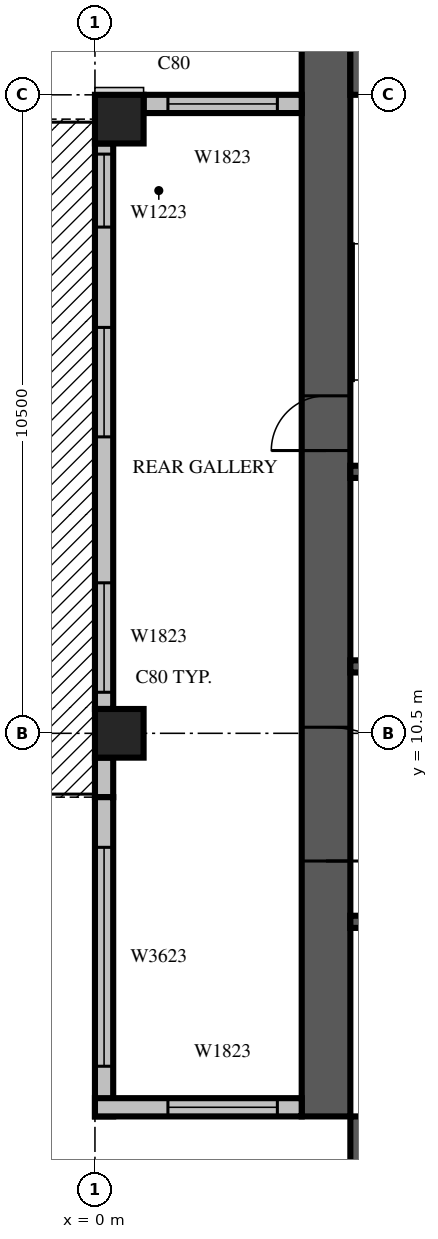
"""IFC4 building model, lengths in metres.
Left out: names, types, materials, properties, quantities, classifications, styles, units other than length and angle.
Written with IfcOpenShell. Run it as: python <this file> out.ifc"""

import sys

from ifc_helpers import new_model, si_unit, direction, frame, frame_2d, origin, origin_2d, place, context, subcontext, project, spatial, rectangle, extrude, source, transform, mapped, element, fill, save


model = new_model("IFC4")
c1 = context("Model", 3, precision=1e-05, world=origin(), true_north=direction((0.0, 1.0)))
c2 = subcontext(c1, "Body", "Model", "MODEL_VIEW")
j1 = project(units=[si_unit("LENGTHUNIT", "METRE"), si_unit("PLANEANGLEUNIT", "RADIAN")], contexts=[c1])
p1 = place(None, origin())
s1 = spatial("IfcSite", under=j1, at=p1, CompositionType="ELEMENT")
p2 = place(p1, origin())
s2 = spatial("IfcBuilding", under=s1, at=p2, CompositionType="ELEMENT")
p3 = place(p2, frame((0.0, 0.0, 246.2)))
s3 = spatial("IfcBuildingStorey", under=s2, at=p3, CompositionType="ELEMENT", Elevation=246.2)
m1 = source(origin(), c2, "Body", "SweptSolid", [
    extrude(rectangle(XDim=0.8, YDim=0.8, at=origin_2d()), origin(), (0.0, 0.0, 1.0), 3.8),
])
for number, where, z_axis, x_axis in (
    (1, (0.4, 10.5, 0.0), (0.0, 0.0, 1.0), (1.0, 0.0, 0.0)),
    (2, (0.4, 20.6, 0.0), (0.0, 0.0, 1.0), (1.0, 0.0, 0.0)),
):
    element("IfcColumn", number, at=place(p3, frame(where, z_axis=z_axis, x_axis=x_axis)), inside=s3, PredefinedType="COLUMN", context=c2, shape_type="MappedRepresentation", body=[
        mapped(m1, transform((0.0, 0.0, 0.0), scale=1.0)),
    ])
m2 = source(origin(), c2, "Body", "SweptSolid", [
    extrude(rectangle(XDim=17.6, YDim=0.8, at=frame_2d((8.8, 0.0))), origin(), (0.0, 0.0, 1.0), 3.8),
])
p4 = place(p3, frame((3.8, 4.2, 0.0), z_axis=(0.0, 0.0, 1.0), x_axis=(0.0, 1.0, 0.0)))
e3 = element("IfcWall", 3, at=p4, inside=s3, PredefinedType="SHEAR", context=c2, shape_type="MappedRepresentation", body=[
    mapped(m2, transform((0.0, 0.0, 0.0), scale=1.0)),
])
m3 = source(origin(), c2, "Body", "SweptSolid", [
    extrude(rectangle(XDim=2.2, YDim=2.1, at=frame_2d((1.1, 1.05))), frame((0.0, 0.41, 0.0), z_axis=(0.0, -1.0, 0.0), x_axis=(1.0, 0.0, 0.0)), (0.0, 0.0, 1.0), 0.82),
])
p5 = place(p4, frame((4.2, 0.0, 0.0)))
e4 = element("IfcOpeningElement", 4, at=p5, cuts=e3, PredefinedType="OPENING", context=c2, shape_type="MappedRepresentation", body=[
    mapped(m3, transform((0.0, 0.0, 0.0), scale=1.0)),
])
m4 = source(origin(), c2, "Body", "SweptSolid", [
    extrude(rectangle(XDim=0.9, YDim=2.1, at=frame_2d((0.45, 1.05))), frame((0.0, 0.41, 0.0), z_axis=(0.0, -1.0, 0.0), x_axis=(1.0, 0.0, 0.0)), (0.0, 0.0, 1.0), 0.82),
])
p6 = place(p4, frame((10.95, 0.0, 0.0)))
e5 = element("IfcOpeningElement", 5, at=p6, cuts=e3, PredefinedType="OPENING", context=c2, shape_type="MappedRepresentation", body=[
    mapped(m4, transform((0.0, 0.0, 0.0), scale=1.0)),
])
p7 = place(p3, frame((4.2, 3.8, 0.0), z_axis=(0.0, 0.0, 1.0), x_axis=(1.0, 0.0, 0.0)))
e6 = element("IfcWall", 6, at=p7, inside=s3, PredefinedType="SHEAR", context=c2, shape_type="MappedRepresentation", body=[
    mapped(m2, transform((0.0, 0.0, 0.0), scale=1.0)),
])
p8 = place(p7, frame((12.75, 0.0, 0.0)))
e7 = element("IfcOpeningElement", 7, at=p8, cuts=e6, PredefinedType="OPENING", context=c2, shape_type="MappedRepresentation", body=[
    mapped(m4, transform((0.0, 0.0, 0.0), scale=1.0)),
])
m5 = source(origin(), c2, "Body", "SweptSolid", [
    extrude(rectangle(XDim=16.8, YDim=0.8, at=frame_2d((8.4, 0.0))), origin(), (0.0, 0.0, 1.0), 3.8),
])
p9 = place(p3, frame((4.2, 21.4, 0.0), z_axis=(0.0, 0.0, 1.0), x_axis=(1.0, 0.0, 0.0)))
e8 = element("IfcWall", 8, at=p9, inside=s3, PredefinedType="SHEAR", context=c2, shape_type="MappedRepresentation", body=[
    mapped(m5, transform((0.0, 0.0, 0.0), scale=1.0)),
])
m6 = source(origin(), c2, "Body", "SweptSolid", [
    extrude(rectangle(XDim=1.2, YDim=2.1, at=frame_2d((0.6, 1.05))), frame((0.0, 0.41, 0.0), z_axis=(0.0, -1.0, 0.0), x_axis=(1.0, 0.0, 0.0)), (0.0, 0.0, 1.0), 0.82),
])
p10 = place(p9, frame((6.2, 0.0, 0.0)))
e9 = element("IfcOpeningElement", 9, at=p10, cuts=e8, PredefinedType="OPENING", context=c2, shape_type="MappedRepresentation", body=[
    mapped(m6, transform((0.0, 0.0, 0.0), scale=1.0)),
])
m7 = source(origin(), c2, "Body", "SweptSolid", [
    extrude(rectangle(XDim=2.6, YDim=0.3, at=frame_2d((1.3, 0.0))), origin(), (0.0, 0.0, 1.0), 3.4),
])
p11 = place(p3, frame((3.4, 20.85, 0.0), z_axis=(0.0, 0.0, 1.0), x_axis=(-1.0, 0.0, 0.0)))
e10 = element("IfcWall", 10, at=p11, inside=s3, PredefinedType="STANDARD", context=c2, shape_type="MappedRepresentation", body=[
    mapped(m7, transform((0.0, 0.0, 0.0), scale=1.0)),
])
m8 = source(origin(), c2, "Body", "SweptSolid", [
    extrude(rectangle(XDim=1.8, YDim=2.3, at=frame_2d((0.9, 1.15))), frame((0.0, 0.16, 0.0), z_axis=(0.0, -1.0, 0.0), x_axis=(1.0, 0.0, 0.0)), (0.0, 0.0, 1.0), 0.32),
])
p12 = place(p11, frame((0.4, 0.0, 0.6)))
e11 = element("IfcOpeningElement", 11, at=p12, cuts=e10, PredefinedType="OPENING", context=c2, shape_type="MappedRepresentation", body=[
    mapped(m8, transform((0.0, 0.0, 0.0), scale=1.0)),
])
m9 = source(origin(), c2, "Body", "SweptSolid", [
    extrude(rectangle(XDim=9.3, YDim=0.3, at=frame_2d((4.65, 0.0))), origin(), (0.0, 0.0, 1.0), 3.4),
])
p13 = place(p3, frame((0.15, 20.2, 0.0), z_axis=(0.0, 0.0, 1.0), x_axis=(0.0, -1.0, 0.0)))
e12 = element("IfcWall", 12, at=p13, inside=s3, PredefinedType="STANDARD", context=c2, shape_type="MappedRepresentation", body=[
    mapped(m9, transform((0.0, 0.0, 0.0), scale=1.0)),
])
m10 = source(origin(), c2, "Body", "SweptSolid", [
    extrude(rectangle(XDim=1.8, YDim=2.4, at=frame_2d((0.9, 1.2))), frame((0.0, 0.16, 0.0), z_axis=(0.0, -1.0, 0.0), x_axis=(1.0, 0.0, 0.0)), (0.0, 0.0, 1.0), 0.32),
])
p14 = place(p13, frame((3.025, 0.0, 0.0)))
e13 = element("IfcOpeningElement", 13, at=p14, cuts=e12, PredefinedType="OPENING", context=c2, shape_type="MappedRepresentation", body=[
    mapped(m10, transform((0.0, 0.0, 0.0), scale=1.0)),
])
m11 = source(origin(), c2, "Body", "SweptSolid", [
    extrude(rectangle(XDim=1.2, YDim=2.3, at=frame_2d((0.6, 1.15))), frame((0.0, 0.16, 0.0), z_axis=(0.0, -1.0, 0.0), x_axis=(1.0, 0.0, 0.0)), (0.0, 0.0, 1.0), 0.32),
])
p15 = place(p13, frame((0.175, 0.0, 0.6)))
e14 = element("IfcOpeningElement", 14, at=p15, cuts=e12, PredefinedType="OPENING", context=c2, shape_type="MappedRepresentation", body=[
    mapped(m11, transform((0.0, 0.0, 0.0), scale=1.0)),
])
p16 = place(p13, frame((7.225, 0.0, 0.6)))
e15 = element("IfcOpeningElement", 15, at=p16, cuts=e12, PredefinedType="OPENING", context=c2, shape_type="MappedRepresentation", body=[
    mapped(m8, transform((0.0, 0.0, 0.0), scale=1.0)),
])
p17 = place(p3, frame((0.15, 10.1, 0.0), z_axis=(0.0, 0.0, 1.0), x_axis=(0.0, -1.0, 0.0)))
e16 = element("IfcWall", 16, at=p17, inside=s3, PredefinedType="STANDARD", context=c2, shape_type="SweptSolid", body=[
    extrude(rectangle(XDim=0.65, YDim=0.3, at=frame_2d((0.325, 0.0))), origin(), (0.0, 0.0, 1.0), 3.4),
])
m12 = source(origin(), c2, "Body", "SweptSolid", [
    extrude(rectangle(XDim=5.25, YDim=0.3, at=frame_2d((2.625, 0.0))), origin(), (0.0, 0.0, 1.0), 3.4),
])
p18 = place(p3, frame((0.15, 9.45, 0.0), z_axis=(0.0, 0.0, 1.0), x_axis=(0.0, -1.0, 0.0)))
e17 = element("IfcWall", 17, at=p18, inside=s3, PredefinedType="STANDARD", context=c2, shape_type="MappedRepresentation", body=[
    mapped(m12, transform((0.0, 0.0, 0.0), scale=1.0)),
])
m13 = source(origin(), c2, "Body", "SweptSolid", [
    extrude(rectangle(XDim=3.6, YDim=2.3, at=frame_2d((1.8, 1.15))), frame((0.0, 0.16, 0.0), z_axis=(0.0, -1.0, 0.0), x_axis=(1.0, 0.0, 0.0)), (0.0, 0.0, 1.0), 0.32),
])
p19 = place(p18, frame((0.825, 0.0, 0.6)))
e18 = element("IfcOpeningElement", 18, at=p19, cuts=e17, PredefinedType="OPENING", context=c2, shape_type="MappedRepresentation", body=[
    mapped(m13, transform((0.0, 0.0, 0.0), scale=1.0)),
])
m14 = source(origin(), c2, "Body", "SweptSolid", [
    extrude(rectangle(XDim=3.4, YDim=0.3, at=frame_2d((1.7, 0.0))), origin(), (0.0, 0.0, 1.0), 3.4),
])
p20 = place(p3, frame((0.0, 4.35, 0.0), z_axis=(0.0, 0.0, 1.0), x_axis=(1.0, 0.0, 0.0)))
e19 = element("IfcWall", 19, at=p20, inside=s3, PredefinedType="STANDARD", context=c2, shape_type="MappedRepresentation", body=[
    mapped(m14, transform((0.0, 0.0, 0.0), scale=1.0)),
])
p21 = place(p20, frame((1.2, 0.0, 0.6)))
e20 = element("IfcOpeningElement", 20, at=p21, cuts=e19, PredefinedType="OPENING", context=c2, shape_type="MappedRepresentation", body=[
    mapped(m8, transform((0.0, 0.0, 0.0), scale=1.0)),
])
m15 = source(origin(), c2, "Body", "SweptSolid", [
    extrude(rectangle(XDim=9.6, YDim=0.2, at=frame_2d((4.8, 0.0))), origin(), (0.0, 0.0, 1.0), 3.8),
])
p22 = place(p3, frame((4.2, 7.4, 0.0), z_axis=(0.0, 0.0, 1.0), x_axis=(1.0, 0.0, 0.0)))
e21 = element("IfcWall", 21, at=p22, inside=s3, PredefinedType="SOLIDWALL", context=c2, shape_type="MappedRepresentation", body=[
    mapped(m15, transform((0.0, 0.0, 0.0), scale=1.0)),
])
m16 = source(origin(), c2, "Body", "SweptSolid", [
    extrude(rectangle(XDim=1.1, YDim=2.1, at=frame_2d((0.55, 1.05))), frame((0.0, 0.11, 0.0), z_axis=(0.0, -1.0, 0.0), x_axis=(1.0, 0.0, 0.0)), (0.0, 0.0, 1.0), 0.22),
])
p23 = place(p22, frame((0.65, 0.0, 0.0)))
e22 = element("IfcOpeningElement", 22, at=p23, cuts=e21, PredefinedType="OPENING", context=c2, shape_type="MappedRepresentation", body=[
    mapped(m16, transform((0.0, 0.0, 0.0), scale=1.0)),
])
p24 = place(p22, frame((3.05, 0.0, 0.0)))
e23 = element("IfcOpeningElement", 23, at=p24, cuts=e21, PredefinedType="OPENING", context=c2, shape_type="MappedRepresentation", body=[
    mapped(m16, transform((0.0, 0.0, 0.0), scale=1.0)),
])
p25 = place(p22, frame((5.45, 0.0, 0.0)))
e24 = element("IfcOpeningElement", 24, at=p25, cuts=e21, PredefinedType="OPENING", context=c2, shape_type="MappedRepresentation", body=[
    mapped(m16, transform((0.0, 0.0, 0.0), scale=1.0)),
])
p26 = place(p22, frame((7.85, 0.0, 0.0)))
e25 = element("IfcOpeningElement", 25, at=p26, cuts=e21, PredefinedType="OPENING", context=c2, shape_type="MappedRepresentation", body=[
    mapped(m16, transform((0.0, 0.0, 0.0), scale=1.0)),
])
m17 = source(origin(), c2, "Body", "SweptSolid", [
    extrude(rectangle(XDim=4.8, YDim=0.2, at=frame_2d((2.4, 0.0))), origin(), (0.0, 0.0, 1.0), 3.8),
])
p27 = place(p3, frame((4.2, 11.6, 0.0), z_axis=(0.0, 0.0, 1.0), x_axis=(1.0, 0.0, 0.0)))
e26 = element("IfcWall", 26, at=p27, inside=s3, PredefinedType="SOLIDWALL", context=c2, shape_type="MappedRepresentation", body=[
    mapped(m17, transform((0.0, 0.0, 0.0), scale=1.0)),
])
p28 = place(p27, frame((0.65, 0.0, 0.0)))
e27 = element("IfcOpeningElement", 27, at=p28, cuts=e26, PredefinedType="OPENING", context=c2, shape_type="MappedRepresentation", body=[
    mapped(m16, transform((0.0, 0.0, 0.0), scale=1.0)),
])
p29 = place(p27, frame((3.05, 0.0, 0.0)))
e28 = element("IfcOpeningElement", 28, at=p29, cuts=e26, PredefinedType="OPENING", context=c2, shape_type="MappedRepresentation", body=[
    mapped(m16, transform((0.0, 0.0, 0.0), scale=1.0)),
])
p30 = place(p3, frame((4.2, 14.8, 0.0), z_axis=(0.0, 0.0, 1.0), x_axis=(1.0, 0.0, 0.0)))
e29 = element("IfcWall", 29, at=p30, inside=s3, PredefinedType="SOLIDWALL", context=c2, shape_type="MappedRepresentation", body=[
    mapped(m17, transform((0.0, 0.0, 0.0), scale=1.0)),
])
m18 = source(origin(), c2, "Body", "SweptSolid", [
    extrude(rectangle(XDim=1.8, YDim=2.3, at=frame_2d((0.9, 1.15))), frame((0.0, 0.03, 0.0), z_axis=(0.0, -1.0, 0.0), x_axis=(1.0, 0.0, 0.0)), (0.0, 0.0, 1.0), 0.06),
])
p31 = place(p12, origin())
e30 = element("IfcWindow", 30, at=p31, inside=s3, PartitioningType="SINGLE_PANEL", PredefinedType="WINDOW", context=c2, shape_type="MappedRepresentation", body=[
    mapped(m18, transform((0.0, 0.0, 0.0), scale=1.0)),
])
fill(e11, e30)
m19 = source(origin(), c2, "Body", "SweptSolid", [
    extrude(rectangle(XDim=1.8, YDim=2.4, at=frame_2d((0.9, 1.2))), frame((0.0, 0.025, 0.0), z_axis=(0.0, -1.0, 0.0), x_axis=(1.0, 0.0, 0.0)), (0.0, 0.0, 1.0), 0.05),
])
p32 = place(p14, origin())
e31 = element("IfcDoor", 31, at=p32, inside=s3, OperationType="SLIDING_TO_LEFT", PredefinedType="DOOR", context=c2, shape_type="MappedRepresentation", body=[
    mapped(m19, transform((0.0, 0.0, 0.0), scale=1.0)),
])
fill(e13, e31)
m20 = source(origin(), c2, "Body", "SweptSolid", [
    extrude(rectangle(XDim=1.2, YDim=2.3, at=frame_2d((0.6, 1.15))), frame((0.0, 0.03, 0.0), z_axis=(0.0, -1.0, 0.0), x_axis=(1.0, 0.0, 0.0)), (0.0, 0.0, 1.0), 0.06),
])
p33 = place(p15, origin())
e32 = element("IfcWindow", 32, at=p33, inside=s3, PartitioningType="SINGLE_PANEL", PredefinedType="WINDOW", context=c2, shape_type="MappedRepresentation", body=[
    mapped(m20, transform((0.0, 0.0, 0.0), scale=1.0)),
])
fill(e14, e32)
p34 = place(p16, origin())
e33 = element("IfcWindow", 33, at=p34, inside=s3, PartitioningType="SINGLE_PANEL", PredefinedType="WINDOW", context=c2, shape_type="MappedRepresentation", body=[
    mapped(m18, transform((0.0, 0.0, 0.0), scale=1.0)),
])
fill(e15, e33)
m21 = source(origin(), c2, "Body", "SweptSolid", [
    extrude(rectangle(XDim=3.6, YDim=2.3, at=frame_2d((1.8, 1.15))), frame((0.0, 0.03, 0.0), z_axis=(0.0, -1.0, 0.0), x_axis=(1.0, 0.0, 0.0)), (0.0, 0.0, 1.0), 0.06),
])
p35 = place(p19, origin())
e34 = element("IfcWindow", 34, at=p35, inside=s3, PartitioningType="SINGLE_PANEL", PredefinedType="WINDOW", context=c2, shape_type="MappedRepresentation", body=[
    mapped(m21, transform((0.0, 0.0, 0.0), scale=1.0)),
])
fill(e18, e34)
p36 = place(p21, origin())
e35 = element("IfcWindow", 35, at=p36, inside=s3, PartitioningType="SINGLE_PANEL", PredefinedType="WINDOW", context=c2, shape_type="MappedRepresentation", body=[
    mapped(m18, transform((0.0, 0.0, 0.0), scale=1.0)),
])
fill(e20, e35)
m22 = source(origin(), c2, "Body", "SweptSolid", [
    extrude(rectangle(XDim=2.2, YDim=2.1, at=frame_2d((1.1, 1.05))), frame((0.0, 0.025, 0.0), z_axis=(0.0, -1.0, 0.0), x_axis=(1.0, 0.0, 0.0)), (0.0, 0.0, 1.0), 0.05),
])
p37 = place(p5, origin())
e36 = element("IfcDoor", 36, at=p37, inside=s3, OperationType="DOUBLE_DOOR_SINGLE_SWING", PredefinedType="DOOR", context=c2, shape_type="MappedRepresentation", body=[
    mapped(m22, transform((0.0, 0.0, 0.0), scale=1.0)),
])
fill(e4, e36)
m23 = source(origin(), c2, "Body", "SweptSolid", [
    extrude(rectangle(XDim=0.9, YDim=2.1, at=frame_2d((0.45, 1.05))), frame((0.0, 0.025, 0.0), z_axis=(0.0, -1.0, 0.0), x_axis=(1.0, 0.0, 0.0)), (0.0, 0.0, 1.0), 0.05),
])
p38 = place(p6, origin())
e37 = element("IfcDoor", 37, at=p38, inside=s3, OperationType="SINGLE_SWING_LEFT", PredefinedType="DOOR", context=c2, shape_type="MappedRepresentation", body=[
    mapped(m23, transform((0.0, 0.0, 0.0), scale=1.0)),
])
fill(e5, e37)
save(model, sys.argv[1])
